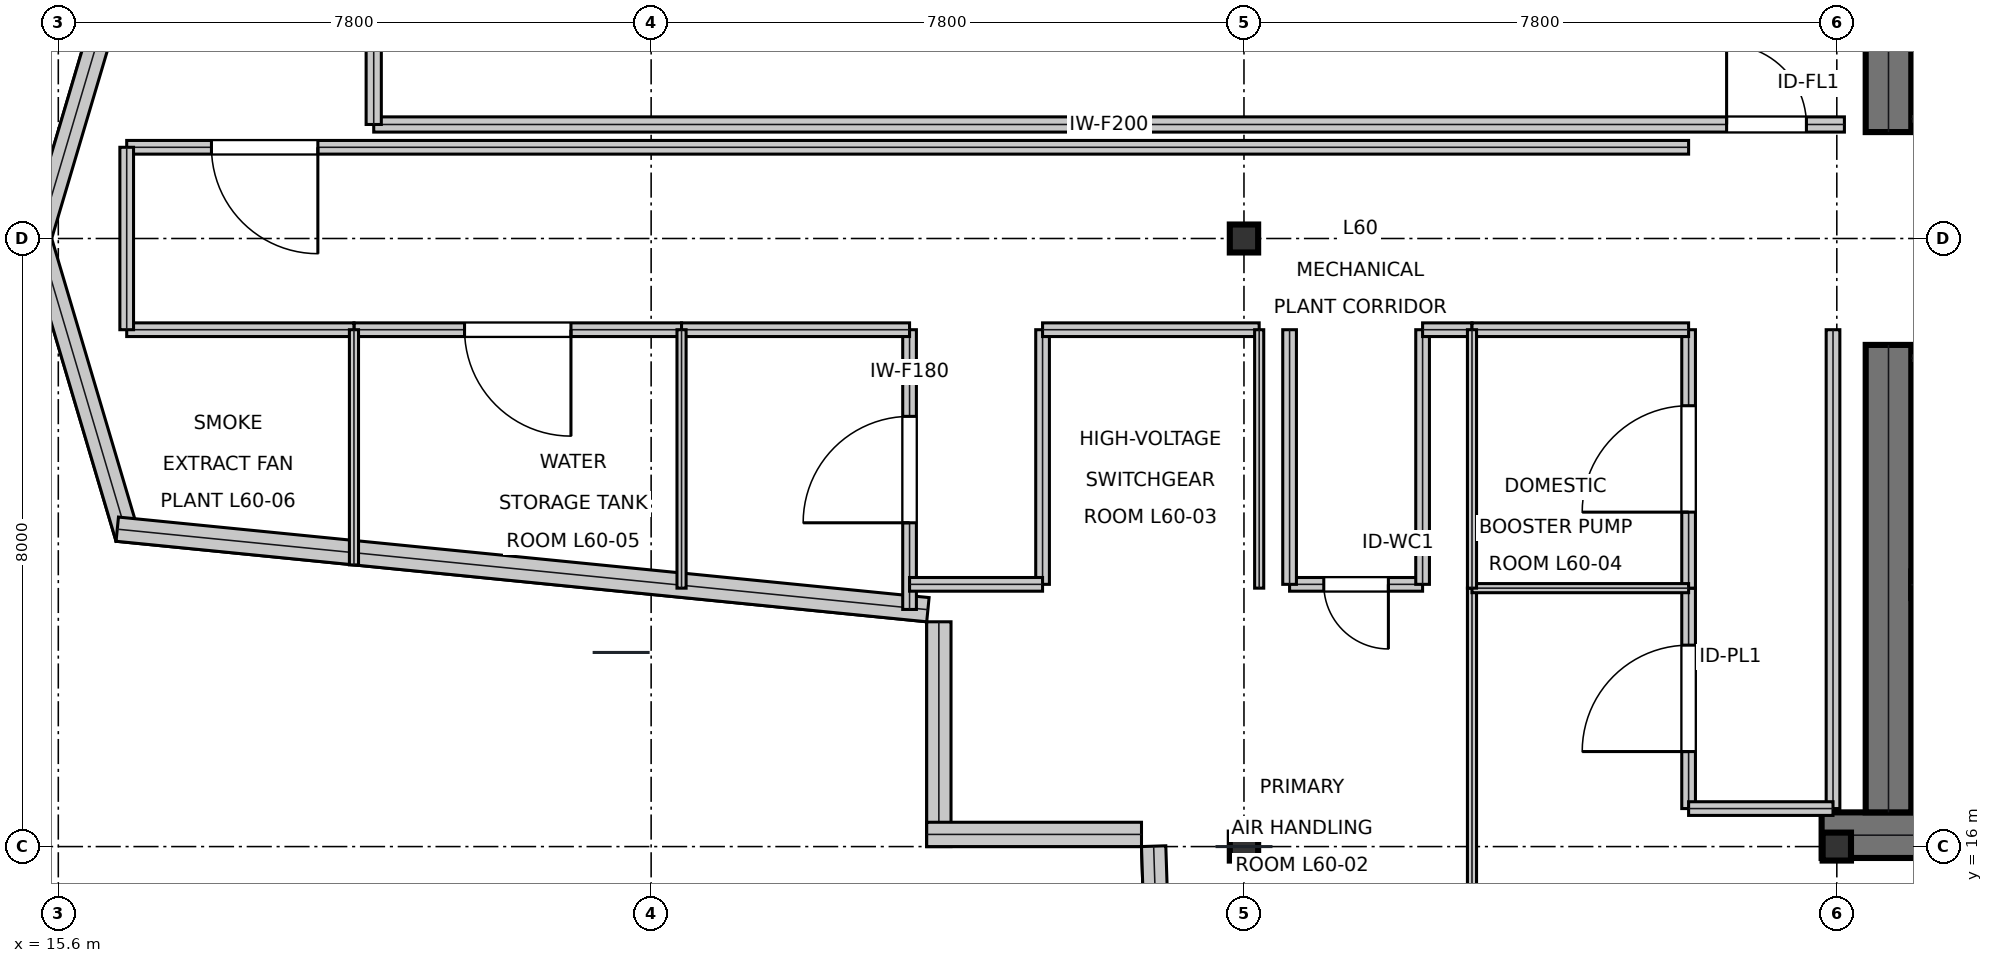
"""IFC4 building model, lengths in metres.
Left out: names, types, materials, properties, quantities, classifications, styles, units other than length and angle.
Written with IfcOpenShell. Run it as: python <this file> out.ifc"""

import sys

from ifc_helpers import new_model, si_unit, direction, frame, frame_2d, origin, origin_2d, place, context, subcontext, project, spatial, rectangle, i_section, extrude, element, fill, save


model = new_model("IFC4")
c1 = context("Model", 3, precision=1e-05, world=origin(), true_north=direction((0.0, 1.0)))
c2 = subcontext(c1, "Body", "Model", "MODEL_VIEW")
j1 = project(units=[si_unit("LENGTHUNIT", "METRE"), si_unit("PLANEANGLEUNIT", "RADIAN")], contexts=[c1])
p1 = place(None, origin())
s1 = spatial("IfcSite", under=j1, at=p1, CompositionType="ELEMENT")
p2 = place(p1, origin())
s2 = spatial("IfcBuilding", under=s1, at=p2, CompositionType="ELEMENT")
p3 = place(p2, frame((0.0, 0.0, 256.65)))
s3 = spatial("IfcBuildingStorey", under=s2, at=p3, CompositionType="ELEMENT", Elevation=256.65)
p4 = place(p3, frame((38.8, 16.15, 0.0), z_axis=(0.0, 0.0, 1.0), x_axis=(1.0, 0.0, 0.0)))
e1 = element("IfcWall", 1, at=p4, inside=s3, PredefinedType="SHEAR", context=c2, shape_type="SweptSolid", body=[
    extrude(rectangle(XDim=16.0, YDim=0.6, at=frame_2d((8.0, 0.0))), origin(), (0.0, 0.0, 1.0), 5.12),
])
p5 = place(p3, frame((39.68, 16.45, 0.0), z_axis=(0.0, 0.0, 1.0), x_axis=(0.0, 1.0, 0.0)))
e2 = element("IfcWall", 2, at=p5, inside=s3, PredefinedType="SHEAR", context=c2, shape_type="SweptSolid", body=[
    extrude(rectangle(XDim=6.15, YDim=0.6, at=frame_2d((3.075, 0.0))), origin(), (0.0, 0.0, 1.0), 5.12),
])
p6 = place(p3, frame((39.68, 25.4, 0.0), z_axis=(0.0, 0.0, 1.0), x_axis=(0.0, 1.0, 0.0)))
e3 = element("IfcWall", 3, at=p6, inside=s3, PredefinedType="SHEAR", context=c2, shape_type="SweptSolid", body=[
    extrude(rectangle(XDim=6.15, YDim=0.6, at=frame_2d((3.075, 0.0))), origin(), (0.0, 0.0, 1.0), 5.12),
])
p7 = place(p6, frame((1.35, 0.0, 0.0)))
e4 = element("IfcOpeningElement", 4, at=p7, cuts=e3, PredefinedType="OPENING", context=c2, shape_type="SweptSolid", body=[
    extrude(rectangle(XDim=1.05, YDim=2.15, at=frame_2d((0.525, 1.075))), frame((0.0, 0.31, 0.0), z_axis=(0.0, -1.0, 0.0), x_axis=(1.0, 0.0, 0.0)), (0.0, 0.0, 1.0), 0.62),
])
p8 = place(p3, frame((39.98, 19.445, 0.0), z_axis=(0.0, 0.0, 1.0), x_axis=(1.0, 0.0, 0.0)))
e5 = element("IfcWall", 5, at=p8, inside=s3, PredefinedType="SHEAR", context=c2, shape_type="SweptSolid", body=[
    extrude(rectangle(XDim=7.71, YDim=0.35, at=frame_2d((3.855, 0.0))), origin(), (0.0, 0.0, 1.0), 5.12),
])
p9 = place(p8, frame((0.25, 0.0, 0.0)))
e6 = element("IfcOpeningElement", 6, at=p9, cuts=e5, PredefinedType="OPENING", context=c2, shape_type="SweptSolid", body=[
    extrude(rectangle(XDim=1.1, YDim=2.15, at=frame_2d((0.55, 1.075))), frame((0.0, 0.185, 0.0), z_axis=(0.0, -1.0, 0.0), x_axis=(1.0, 0.0, 0.0)), (0.0, 0.0, 1.0), 0.37),
])
for number, where, z_axis, x_axis in (
    (7, (31.2, 16.0, 0.0), (0.0, 0.0, 1.0), (1.0, 0.0, 0.0)),
    (8, (31.2, 24.0, 0.0), (0.0, 0.0, 1.0), (1.0, 0.0, 0.0)),
    (9, (39.0, 16.0, 0.0), (0.0, 0.0, 1.0), (1.0, 0.0, 0.0)),
):
    element("IfcColumn", number, at=place(p3, frame(where, z_axis=z_axis, x_axis=x_axis)), inside=s3, PredefinedType="COLUMN", context=c2, shape_type="SweptSolid", body=[
        extrude(i_section(OverallWidth=0.373, OverallDepth=0.368, WebThickness=0.015, FlangeThickness=0.024, at=origin_2d()), origin(), (0.0, 0.0, 1.0), 5.394),
    ])
for number, where, z_axis, x_axis in (
    (10, (16.513, 27.938, 0.0), (0.0, 0.0, 1.0), (-0.284, -0.959, 0.0)),
    (11, (15.333, 24.045, 0.0), (0.0, 0.0, 1.0), (0.284, -0.959, 0.0)),
):
    element("IfcWall", number, at=place(p3, frame(where, z_axis=z_axis, x_axis=x_axis)), inside=s3, PredefinedType="STANDARD", context=c2, shape_type="SweptSolid", body=[
        extrude(rectangle(XDim=4.155, YDim=0.32, at=frame_2d((2.077, 0.0))), origin(), (0.0, 0.0, 1.0), 4.58),
    ])
p10 = place(p3, frame((16.376, 20.176, 0.0), z_axis=(0.0, 0.0, 1.0), x_axis=(0.995106185687, -0.098811331369, 0.0)))
e12 = element("IfcWall", 12, at=p10, inside=s3, PredefinedType="STANDARD", context=c2, shape_type="SweptSolid", body=[
    extrude(rectangle(XDim=10.718, YDim=0.32, at=frame_2d((5.359, 0.0))), origin(), (0.0, 0.0, 1.0), 4.649),
])
p11 = place(p3, frame((27.186, 18.958, 0.0), z_axis=(0.0, 0.0, 1.0), x_axis=(0.0, -1.0, 0.0)))
e13 = element("IfcWall", 13, at=p11, inside=s3, PredefinedType="STANDARD", context=c2, shape_type="SweptSolid", body=[
    extrude(rectangle(XDim=2.958, YDim=0.32, at=frame_2d((1.479, 0.0))), origin(), (0.0, 0.0, 1.0), 4.649),
])
p12 = place(p3, frame((27.026, 16.16, 0.0), z_axis=(0.0, 0.0, 1.0), x_axis=(1.0, 0.0, 0.0)))
e14 = element("IfcWall", 14, at=p12, inside=s3, PredefinedType="STANDARD", context=c2, shape_type="SweptSolid", body=[
    extrude(rectangle(XDim=2.826, YDim=0.32, at=frame_2d((1.413, 0.0))), origin(), (0.0, 0.0, 1.0), 5.12),
])
p13 = place(p3, frame((30.012, 16.005, 0.0), z_axis=(0.0, 0.0, 1.0), x_axis=(0.032564460351, -0.999469637319, 0.0)))
e15 = element("IfcWall", 15, at=p13, inside=s3, PredefinedType="STANDARD", context=c2, shape_type="SweptSolid", body=[
    extrude(rectangle(XDim=6.403, YDim=0.32, at=frame_2d((3.201, 0.0))), origin(), (0.0, 0.0, 1.0), 5.12),
])
p14 = place(p3, frame((39.98, 25.575, 0.0), z_axis=(0.0, 0.0, 1.0), x_axis=(1.0, 0.0, 0.0)))
e16 = element("IfcWall", 16, at=p14, inside=s3, PredefinedType="PARTITIONING", context=c2, shape_type="SweptSolid", body=[
    extrude(rectangle(XDim=5.9, YDim=0.15, at=frame_2d((2.95, 0.0))), origin(), (0.0, 0.0, 1.0), 5.12),
])
p15 = place(p14, frame((2.35, 0.0, 0.0)))
e17 = element("IfcOpeningElement", 17, at=p15, cuts=e16, PredefinedType="OPENING", context=c2, shape_type="SweptSolid", body=[
    extrude(rectangle(XDim=1.05, YDim=2.15, at=frame_2d((0.525, 1.075))), frame((0.0, 0.085, 0.0), z_axis=(0.0, -1.0, 0.0), x_axis=(1.0, 0.0, 0.0)), (0.0, 0.0, 1.0), 0.17),
])
p16 = place(p3, frame((39.98, 22.425, 0.0), z_axis=(0.0, 0.0, 1.0), x_axis=(1.0, 0.0, 0.0)))
e18 = element("IfcWall", 18, at=p16, inside=s3, PredefinedType="PARTITIONING", context=c2, shape_type="SweptSolid", body=[
    extrude(rectangle(XDim=5.9, YDim=0.15, at=frame_2d((2.95, 0.0))), origin(), (0.0, 0.0, 1.0), 5.12),
])
p17 = place(p16, frame((2.35, 0.0, 0.0)))
e19 = element("IfcOpeningElement", 19, at=p17, cuts=e18, PredefinedType="OPENING", context=c2, shape_type="SweptSolid", body=[
    extrude(rectangle(XDim=1.05, YDim=2.15, at=frame_2d((0.525, 1.075))), frame((0.0, 0.085, 0.0), z_axis=(0.0, -1.0, 0.0), x_axis=(1.0, 0.0, 0.0)), (0.0, 0.0, 1.0), 0.17),
])
p18 = place(p3, frame((19.75, 25.5, 0.0), z_axis=(0.0, 0.0, 1.0), x_axis=(1.0, 0.0, 0.0)))
e20 = element("IfcWall", 20, at=p18, inside=s3, PredefinedType="SOLIDWALL", context=c2, shape_type="SweptSolid", body=[
    extrude(rectangle(XDim=19.35, YDim=0.2, at=frame_2d((9.675, 0.0))), origin(), (0.0, 0.0, 1.0), 4.58),
])
p19 = place(p18, frame((17.8, 0.0, 0.0)))
e21 = element("IfcOpeningElement", 21, at=p19, cuts=e20, PredefinedType="OPENING", context=c2, shape_type="SweptSolid", body=[
    extrude(rectangle(XDim=1.05, YDim=2.15, at=frame_2d((0.525, 1.075))), frame((0.0, 0.11, 0.0), z_axis=(0.0, -1.0, 0.0), x_axis=(1.0, 0.0, 0.0)), (0.0, 0.0, 1.0), 0.22),
])
p20 = place(p3, frame((19.75, 25.5, 0.0), z_axis=(0.0, 0.0, 1.0), x_axis=(0.0, 1.0, 0.0)))
e22 = element("IfcWall", 22, at=p20, inside=s3, PredefinedType="SOLIDWALL", context=c2, shape_type="SweptSolid", body=[
    extrude(rectangle(XDim=2.68, YDim=0.2, at=frame_2d((1.34, 0.0))), origin(), (0.0, 0.0, 1.0), 4.58),
])
p21 = place(p3, frame((37.05, 16.5, 0.0), z_axis=(0.0, 0.0, 1.0), x_axis=(0.0, 1.0, 0.0)))
e23 = element("IfcWall", 23, at=p21, inside=s3, PredefinedType="SOLIDWALL", context=c2, shape_type="SweptSolid", body=[
    extrude(rectangle(XDim=2.9, YDim=0.18, at=frame_2d((1.45, 0.0))), origin(), (0.0, 0.0, 1.0), 4.85),
])
p22 = place(p21, frame((0.75, 0.0, 0.0)))
e24 = element("IfcOpeningElement", 24, at=p22, cuts=e23, PredefinedType="OPENING", context=c2, shape_type="SweptSolid", body=[
    extrude(rectangle(XDim=1.4, YDim=2.2, at=frame_2d((0.7, 1.1))), frame((0.0, 0.1, 0.0), z_axis=(0.0, -1.0, 0.0), x_axis=(1.0, 0.0, 0.0)), (0.0, 0.0, 1.0), 0.2),
])
p23 = place(p3, frame((31.8, 19.45, 0.0), z_axis=(0.0, 0.0, 1.0), x_axis=(1.0, 0.0, 0.0)))
e25 = element("IfcWall", 25, at=p23, inside=s3, PredefinedType="SOLIDWALL", context=c2, shape_type="SweptSolid", body=[
    extrude(rectangle(XDim=1.75, YDim=0.18, at=frame_2d((0.875, 0.0))), origin(), (0.0, 0.0, 1.0), 5.12),
])
p24 = place(p23, frame((0.45, 0.0, 0.0)))
e26 = element("IfcOpeningElement", 26, at=p24, cuts=e25, PredefinedType="OPENING", context=c2, shape_type="SweptSolid", body=[
    extrude(rectangle(XDim=0.85, YDim=2.15, at=frame_2d((0.425, 1.075))), frame((0.0, 0.1, 0.0), z_axis=(0.0, -1.0, 0.0), x_axis=(1.0, 0.0, 0.0)), (0.0, 0.0, 1.0), 0.2),
])
p25 = place(p3, frame((26.8, 19.12, 0.0), z_axis=(0.0, 0.0, 1.0), x_axis=(0.0, 1.0, 0.0)))
e27 = element("IfcWall", 27, at=p25, inside=s3, PredefinedType="SOLIDWALL", context=c2, shape_type="SweptSolid", body=[
    extrude(rectangle(XDim=3.68, YDim=0.18, at=frame_2d((1.84, 0.0))), origin(), (0.0, 0.0, 1.0), 5.12),
])
p26 = place(p25, frame((1.14, 0.0, 0.0)))
e28 = element("IfcOpeningElement", 28, at=p26, cuts=e27, PredefinedType="OPENING", context=c2, shape_type="SweptSolid", body=[
    extrude(rectangle(XDim=1.4, YDim=2.2, at=frame_2d((0.7, 1.1))), frame((0.0, 0.1, 0.0), z_axis=(0.0, -1.0, 0.0), x_axis=(1.0, 0.0, 0.0)), (0.0, 0.0, 1.0), 0.2),
])
p27 = place(p3, frame((37.05, 19.4, 0.0), z_axis=(0.0, 0.0, 1.0), x_axis=(0.0, 1.0, 0.0)))
e29 = element("IfcWall", 29, at=p27, inside=s3, PredefinedType="SOLIDWALL", context=c2, shape_type="SweptSolid", body=[
    extrude(rectangle(XDim=3.4, YDim=0.18, at=frame_2d((1.7, 0.0))), origin(), (0.0, 0.0, 1.0), 4.85),
])
p28 = place(p27, frame((1.0, 0.0, 0.0)))
e30 = element("IfcOpeningElement", 30, at=p28, cuts=e29, PredefinedType="OPENING", context=c2, shape_type="SweptSolid", body=[
    extrude(rectangle(XDim=1.4, YDim=2.2, at=frame_2d((0.7, 1.1))), frame((0.0, 0.1, 0.0), z_axis=(0.0, -1.0, 0.0), x_axis=(1.0, 0.0, 0.0)), (0.0, 0.0, 1.0), 0.2),
])
p29 = place(p3, frame((19.49, 22.8, 0.0), z_axis=(0.0, 0.0, 1.0), x_axis=(1.0, 0.0, 0.0)))
e31 = element("IfcWall", 31, at=p29, inside=s3, PredefinedType="SOLIDWALL", context=c2, shape_type="SweptSolid", body=[
    extrude(rectangle(XDim=4.31, YDim=0.18, at=frame_2d((2.155, 0.0))), origin(), (0.0, 0.0, 1.0), 4.58),
])
p30 = place(p29, frame((1.455, 0.0, 0.0)))
e32 = element("IfcOpeningElement", 32, at=p30, cuts=e31, PredefinedType="OPENING", context=c2, shape_type="SweptSolid", body=[
    extrude(rectangle(XDim=1.4, YDim=2.2, at=frame_2d((0.7, 1.1))), frame((0.0, 0.1, 0.0), z_axis=(0.0, -1.0, 0.0), x_axis=(1.0, 0.0, 0.0)), (0.0, 0.0, 1.0), 0.2),
])
p31 = place(p3, frame((16.5, 25.2, 0.0), z_axis=(0.0, 0.0, 1.0), x_axis=(1.0, 0.0, 0.0)))
e33 = element("IfcWall", 33, at=p31, inside=s3, PredefinedType="SOLIDWALL", context=c2, shape_type="SweptSolid", body=[
    extrude(rectangle(XDim=20.55, YDim=0.18, at=frame_2d((10.275, 0.0))), origin(), (0.0, 0.0, 1.0), 4.58),
])
p32 = place(p31, frame((1.115, 0.0, 0.0)))
e34 = element("IfcOpeningElement", 34, at=p32, cuts=e33, PredefinedType="OPENING", context=c2, shape_type="SweptSolid", body=[
    extrude(rectangle(XDim=1.4, YDim=2.2, at=frame_2d((0.7, 1.1))), frame((0.0, 0.1, 0.0), z_axis=(0.0, -1.0, 0.0), x_axis=(1.0, 0.0, 0.0)), (0.0, 0.0, 1.0), 0.2),
])
p33 = place(p3, frame((38.95, 16.5, 0.0), z_axis=(0.0, 0.0, 1.0), x_axis=(0.0, 1.0, 0.0)))
e35 = element("IfcWall", 35, at=p33, inside=s3, PredefinedType="SOLIDWALL", context=c2, shape_type="SweptSolid", body=[
    extrude(rectangle(XDim=6.3, YDim=0.18, at=frame_2d((3.15, 0.0))), origin(), (0.0, 0.0, 1.0), 4.85),
])
p34 = place(p3, frame((37.05, 16.5, 0.0), z_axis=(0.0, 0.0, 1.0), x_axis=(1.0, 0.0, 0.0)))
e36 = element("IfcWall", 36, at=p34, inside=s3, PredefinedType="SOLIDWALL", context=c2, shape_type="SweptSolid", body=[
    extrude(rectangle(XDim=1.9, YDim=0.18, at=frame_2d((0.95, 0.0))), origin(), (0.0, 0.0, 1.0), 5.12),
])
for number, where, z_axis, x_axis in (
    (37, (33.55, 19.45, 0.0), (0.0, 0.0, 1.0), (0.0, 1.0, 0.0)),
    (38, (31.8, 19.45, 0.0), (0.0, 0.0, 1.0), (0.0, 1.0, 0.0)),
):
    element("IfcWall", number, at=place(p3, frame(where, z_axis=z_axis, x_axis=x_axis)), inside=s3, PredefinedType="SOLIDWALL", context=c2, shape_type="SweptSolid", body=[
        extrude(rectangle(XDim=3.35, YDim=0.18, at=frame_2d((1.675, 0.0))), origin(), (0.0, 0.0, 1.0), 4.85),
    ])
p35 = place(p3, frame((33.55, 22.8, 0.0), z_axis=(0.0, 0.0, 1.0), x_axis=(1.0, 0.0, 0.0)))
e39 = element("IfcWall", 39, at=p35, inside=s3, PredefinedType="SOLIDWALL", context=c2, shape_type="SweptSolid", body=[
    extrude(rectangle(XDim=0.65, YDim=0.18, at=frame_2d((0.325, 0.0))), origin(), (0.0, 0.0, 1.0), 5.12),
])
p36 = place(p3, frame((28.55, 19.45, 0.0), z_axis=(0.0, 0.0, 1.0), x_axis=(0.0, 1.0, 0.0)))
e40 = element("IfcWall", 40, at=p36, inside=s3, PredefinedType="SOLIDWALL", context=c2, shape_type="SweptSolid", body=[
    extrude(rectangle(XDim=3.35, YDim=0.18, at=frame_2d((1.675, 0.0))), origin(), (0.0, 0.0, 1.0), 5.12),
])
p37 = place(p3, frame((23.8, 22.8, 0.0), z_axis=(0.0, 0.0, 1.0), x_axis=(1.0, 0.0, 0.0)))
e41 = element("IfcWall", 41, at=p37, inside=s3, PredefinedType="SOLIDWALL", context=c2, shape_type="SweptSolid", body=[
    extrude(rectangle(XDim=3.0, YDim=0.18, at=frame_2d((1.5, 0.0))), origin(), (0.0, 0.0, 1.0), 4.58),
])
p38 = place(p3, frame((28.55, 22.8, 0.0), z_axis=(0.0, 0.0, 1.0), x_axis=(1.0, 0.0, 0.0)))
e42 = element("IfcWall", 42, at=p38, inside=s3, PredefinedType="SOLIDWALL", context=c2, shape_type="SweptSolid", body=[
    extrude(rectangle(XDim=2.85, YDim=0.18, at=frame_2d((1.425, 0.0))), origin(), (0.0, 0.0, 1.0), 4.58),
])
p39 = place(p3, frame((26.8, 19.45, 0.0), z_axis=(0.0, 0.0, 1.0), x_axis=(1.0, 0.0, 0.0)))
e43 = element("IfcWall", 43, at=p39, inside=s3, PredefinedType="SOLIDWALL", context=c2, shape_type="SweptSolid", body=[
    extrude(rectangle(XDim=1.75, YDim=0.18, at=frame_2d((0.875, 0.0))), origin(), (0.0, 0.0, 1.0), 5.12),
])
p40 = place(p3, frame((34.2, 22.8, 0.0), z_axis=(0.0, 0.0, 1.0), x_axis=(1.0, 0.0, 0.0)))
e44 = element("IfcWall", 44, at=p40, inside=s3, PredefinedType="SOLIDWALL", context=c2, shape_type="SweptSolid", body=[
    extrude(rectangle(XDim=2.85, YDim=0.18, at=frame_2d((1.425, 0.0))), origin(), (0.0, 0.0, 1.0), 5.12),
])
p41 = place(p3, frame((16.5, 22.8, 0.0), z_axis=(0.0, 0.0, 1.0), x_axis=(1.0, 0.0, 0.0)))
e45 = element("IfcWall", 45, at=p41, inside=s3, PredefinedType="SOLIDWALL", context=c2, shape_type="SweptSolid", body=[
    extrude(rectangle(XDim=2.99, YDim=0.18, at=frame_2d((1.495, 0.0))), origin(), (0.0, 0.0, 1.0), 5.12),
])
p42 = place(p3, frame((16.5, 22.8, 0.0), z_axis=(0.0, 0.0, 1.0), x_axis=(0.0, 1.0, 0.0)))
e46 = element("IfcWall", 46, at=p42, inside=s3, PredefinedType="SOLIDWALL", context=c2, shape_type="SweptSolid", body=[
    extrude(rectangle(XDim=2.4, YDim=0.18, at=frame_2d((1.2, 0.0))), origin(), (0.0, 0.0, 1.0), 5.12),
])
p43 = place(p3, frame((34.2, 8.854, 0.0), z_axis=(0.0, 0.0, 1.0), x_axis=(0.0, 1.0, 0.0)))
e47 = element("IfcWall", 47, at=p43, inside=s3, PredefinedType="PARTITIONING", context=c2, shape_type="SweptSolid", body=[
    extrude(rectangle(XDim=10.546, YDim=0.12, at=frame_2d((5.273, 0.0))), origin(), (0.0, 0.0, 1.0), 4.58),
])
p44 = place(p3, frame((34.2, 19.4, 0.0), z_axis=(0.0, 0.0, 1.0), x_axis=(1.0, 0.0, 0.0)))
e48 = element("IfcWall", 48, at=p44, inside=s3, PredefinedType="PARTITIONING", context=c2, shape_type="SweptSolid", body=[
    extrude(rectangle(XDim=2.85, YDim=0.12, at=frame_2d((1.425, 0.0))), origin(), (0.0, 0.0, 1.0), 5.12),
])
p45 = place(p3, frame((31.4, 19.4, 0.0), z_axis=(0.0, 0.0, 1.0), x_axis=(0.0, 1.0, 0.0)))
e49 = element("IfcWall", 49, at=p45, inside=s3, PredefinedType="PARTITIONING", context=c2, shape_type="SweptSolid", body=[
    extrude(rectangle(XDim=3.4, YDim=0.12, at=frame_2d((1.7, 0.0))), origin(), (0.0, 0.0, 1.0), 4.58),
])
p46 = place(p3, frame((34.2, 19.4, 0.0), z_axis=(0.0, 0.0, 1.0), x_axis=(0.0, 1.0, 0.0)))
e50 = element("IfcWall", 50, at=p46, inside=s3, PredefinedType="PARTITIONING", context=c2, shape_type="SweptSolid", body=[
    extrude(rectangle(XDim=3.4, YDim=0.12, at=frame_2d((1.7, 0.0))), origin(), (0.0, 0.0, 1.0), 5.12),
])
p47 = place(p3, frame((23.8, 19.4, 0.0), z_axis=(0.0, 0.0, 1.0), x_axis=(0.0, 1.0, 0.0)))
e51 = element("IfcWall", 51, at=p47, inside=s3, PredefinedType="PARTITIONING", context=c2, shape_type="SweptSolid", body=[
    extrude(rectangle(XDim=3.4, YDim=0.12, at=frame_2d((1.7, 0.0))), origin(), (0.0, 0.0, 1.0), 4.58),
])
p48 = place(p3, frame((19.49, 19.706, 0.0), z_axis=(0.0, 0.0, 1.0), x_axis=(0.0, 1.0, 0.0)))
e52 = element("IfcWall", 52, at=p48, inside=s3, PredefinedType="PARTITIONING", context=c2, shape_type="SweptSolid", body=[
    extrude(rectangle(XDim=3.094, YDim=0.12, at=frame_2d((1.547, 0.0))), origin(), (0.0, 0.0, 1.0), 4.58),
])
p49 = place(p19, origin())
e53 = element("IfcDoor", 53, at=p49, inside=s3, OperationType="SINGLE_SWING_LEFT", PredefinedType="DOOR", context=c2, shape_type="SweptSolid", body=[
    extrude(rectangle(XDim=1.05, YDim=2.15, at=frame_2d((0.525, 1.075))), frame((0.0, 0.025, 0.0), z_axis=(0.0, -1.0, 0.0), x_axis=(1.0, 0.0, 0.0)), (0.0, 0.0, 1.0), 0.05),
])
fill(e21, e53)
p50 = place(p22, origin())
e54 = element("IfcDoor", 54, at=p50, inside=s3, OperationType="SINGLE_SWING_LEFT", PredefinedType="DOOR", context=c2, shape_type="SweptSolid", body=[
    extrude(rectangle(XDim=1.4, YDim=2.2, at=frame_2d((0.7, 1.1))), frame((0.0, 0.025, 0.0), z_axis=(0.0, -1.0, 0.0), x_axis=(1.0, 0.0, 0.0)), (0.0, 0.0, 1.0), 0.05),
])
fill(e24, e54)
p51 = place(p24, frame((0.85, 0.0, 0.0), z_axis=(0.0, 0.0, 1.0), x_axis=(-1.0, 0.0, 0.0)))
e55 = element("IfcDoor", 55, at=p51, inside=s3, OperationType="SINGLE_SWING_LEFT", PredefinedType="DOOR", context=c2, shape_type="SweptSolid", body=[
    extrude(rectangle(XDim=0.85, YDim=2.15, at=frame_2d((0.425, 1.075))), frame((0.0, 0.025, 0.0), z_axis=(0.0, -1.0, 0.0), x_axis=(1.0, 0.0, 0.0)), (0.0, 0.0, 1.0), 0.05),
])
fill(e26, e55)
p52 = place(p26, origin())
e56 = element("IfcDoor", 56, at=p52, inside=s3, OperationType="SINGLE_SWING_LEFT", PredefinedType="DOOR", context=c2, shape_type="SweptSolid", body=[
    extrude(rectangle(XDim=1.4, YDim=2.2, at=frame_2d((0.7, 1.1))), frame((0.0, 0.025, 0.0), z_axis=(0.0, -1.0, 0.0), x_axis=(1.0, 0.0, 0.0)), (0.0, 0.0, 1.0), 0.05),
])
fill(e28, e56)
p53 = place(p28, origin())
e57 = element("IfcDoor", 57, at=p53, inside=s3, OperationType="SINGLE_SWING_LEFT", PredefinedType="DOOR", context=c2, shape_type="SweptSolid", body=[
    extrude(rectangle(XDim=1.4, YDim=2.2, at=frame_2d((0.7, 1.1))), frame((0.0, 0.025, 0.0), z_axis=(0.0, -1.0, 0.0), x_axis=(1.0, 0.0, 0.0)), (0.0, 0.0, 1.0), 0.05),
])
fill(e30, e57)
p54 = place(p30, frame((1.4, 0.0, 0.0), z_axis=(0.0, 0.0, 1.0), x_axis=(-1.0, 0.0, 0.0)))
e58 = element("IfcDoor", 58, at=p54, inside=s3, OperationType="SINGLE_SWING_LEFT", PredefinedType="DOOR", context=c2, shape_type="SweptSolid", body=[
    extrude(rectangle(XDim=1.4, YDim=2.2, at=frame_2d((0.7, 1.1))), frame((0.0, 0.025, 0.0), z_axis=(0.0, -1.0, 0.0), x_axis=(1.0, 0.0, 0.0)), (0.0, 0.0, 1.0), 0.05),
])
fill(e32, e58)
p55 = place(p32, frame((1.4, 0.0, 0.0), z_axis=(0.0, 0.0, 1.0), x_axis=(-1.0, 0.0, 0.0)))
e59 = element("IfcDoor", 59, at=p55, inside=s3, OperationType="SINGLE_SWING_LEFT", PredefinedType="DOOR", context=c2, shape_type="SweptSolid", body=[
    extrude(rectangle(XDim=1.4, YDim=2.2, at=frame_2d((0.7, 1.1))), frame((0.0, 0.025, 0.0), z_axis=(0.0, -1.0, 0.0), x_axis=(1.0, 0.0, 0.0)), (0.0, 0.0, 1.0), 0.05),
])
fill(e34, e59)
save(model, sys.argv[1])
